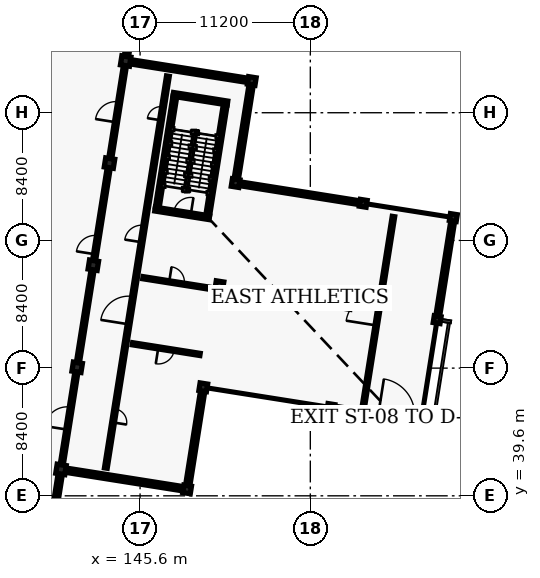
"""IFC4 building model, lengths in metres.
Left out: names, types, materials, properties, quantities, classifications, styles, units other than length and angle.
Written with IfcOpenShell. Run it as: python <this file> out.ifc"""

import sys

from ifc_helpers import new_model, si_unit, direction, frame, frame_2d, origin, origin_2d, place, context, subcontext, project, spatial, rectangle, circle, extrude, element, fill, save


model = new_model("IFC4")
c1 = context("Model", 3, precision=1e-05, world=origin(), true_north=direction((0.0, 1.0)))
c2 = subcontext(c1, "Body", "Model", "MODEL_VIEW")
j1 = project(units=[si_unit("LENGTHUNIT", "METRE"), si_unit("PLANEANGLEUNIT", "RADIAN")], contexts=[c1])
p1 = place(None, origin())
s1 = spatial("IfcSite", under=j1, at=p1, CompositionType="ELEMENT")
p2 = place(p1, origin())
s2 = spatial("IfcBuilding", under=s1, at=p2, CompositionType="ELEMENT")
p3 = place(p2, origin())
s3 = spatial("IfcBuildingStorey", under=s2, at=p3, CompositionType="ELEMENT", Elevation=0.0)
for number, where, z_axis, x_axis in (
    (1, (140.398, 41.337, 0.0), (0.0, 0.0, 1.0), (0.988, -0.156, 0.0)),
    (2, (141.462, 48.054, 0.0), (0.0, 0.0, 1.0), (0.988, -0.156, 0.0)),
    (3, (142.525, 54.77, 0.0), (0.0, 0.0, 1.0), (0.988, -0.156, 0.0)),
    (4, (143.589, 61.486, 0.0), (0.0, 0.0, 1.0), (0.988, -0.156, 0.0)),
    (5, (144.653, 68.202, 0.0), (0.0, 0.0, 1.0), (0.988, -0.156, 0.0)),
):
    element("IfcColumn", number, at=place(p3, frame(where, z_axis=z_axis, x_axis=x_axis)), inside=s3, PredefinedType="COLUMN", context=c2, shape_type="SweptSolid", body=[
        extrude(rectangle(XDim=0.6, YDim=0.6, at=origin_2d()), origin(), (0.0, 0.0, 1.0), 4.8),
    ])
for number, where, z_axis, x_axis in (
    (6, (148.694, 40.023, 0.0), (0.0, 0.0, 1.0), (0.988, -0.156, 0.0)),
    (7, (149.758, 46.74, 0.0), (0.0, 0.0, 1.0), (0.988, -0.156, 0.0)),
    (8, (150.822, 53.456, 0.0), (0.0, 0.0, 1.0), (0.988, -0.156, 0.0)),
    (9, (151.886, 60.172, 0.0), (0.0, 0.0, 1.0), (0.988, -0.156, 0.0)),
    (10, (152.949, 66.888, 0.0), (0.0, 0.0, 1.0), (0.988, -0.156, 0.0)),
):
    element("IfcColumn", number, at=place(p3, frame(where, z_axis=z_axis, x_axis=x_axis)), inside=s3, PredefinedType="COLUMN", context=c2, shape_type="SweptSolid", body=[
        extrude(rectangle(XDim=0.5, YDim=0.5, at=origin_2d()), origin(), (0.0, 0.0, 1.0), 4.8),
    ])
for number, where, z_axis, x_axis in (
    (11, (158.154, 45.41, 0.0), (0.0, 0.0, 1.0), (0.988, -0.156, 0.0)),
    (12, (159.217, 52.126, 0.0), (0.0, 0.0, 1.0), (0.988, -0.156, 0.0)),
    (13, (160.281, 58.842, 0.0), (0.0, 0.0, 1.0), (0.988, -0.156, 0.0)),
    (14, (164.08, 44.471, 0.0), (0.0, 0.0, 1.0), (0.988, -0.156, 0.0)),
    (15, (165.143, 51.188, 0.0), (0.0, 0.0, 1.0), (0.988, -0.156, 0.0)),
    (16, (166.207, 57.904, 0.0), (0.0, 0.0, 1.0), (0.988, -0.156, 0.0)),
):
    element("IfcColumn", number, at=place(p3, frame(where, z_axis=z_axis, x_axis=x_axis)), inside=s3, PredefinedType="PILASTER", context=c2, shape_type="SweptSolid", body=[
        extrude(circle(Radius=0.225, at=origin_2d()), origin(), (0.0, 0.0, 1.0), 4.8),
    ])
p4 = place(p3, frame((148.71, 40.122, 0.0), z_axis=(0.0, 0.0, 1.0), x_axis=(0.156500089252, 0.987677944506, 0.0)))
e17 = element("IfcWall", 17, at=p4, inside=s3, PredefinedType="SOLIDWALL", context=c2, shape_type="SweptSolid", body=[
    extrude(rectangle(XDim=6.6, YDim=0.28, at=frame_2d((3.3, 0.0))), origin(), (0.0, 0.0, 1.0), 3.928),
])
p5 = place(p4, frame((2.6, 0.0, 1.35)))
e18 = element("IfcOpeningElement", 18, at=p5, cuts=e17, PredefinedType="OPENING", context=c2, shape_type="SweptSolid", body=[
    extrude(rectangle(XDim=1.4, YDim=1.2, at=frame_2d((0.7, 0.6))), frame((0.0, 0.15, 0.0), z_axis=(0.0, -1.0, 0.0), x_axis=(1.0, 0.0, 0.0)), (0.0, 0.0, 1.0), 0.3),
])
p6 = place(p3, frame((151.901, 60.271, 0.0), z_axis=(0.0, 0.0, 1.0), x_axis=(0.156536171909, 0.987672226442, 0.0)))
e19 = element("IfcWall", 19, at=p6, inside=s3, PredefinedType="SOLIDWALL", context=c2, shape_type="SweptSolid", body=[
    extrude(rectangle(XDim=6.6, YDim=0.28, at=frame_2d((3.3, 0.0))), origin(), (0.0, 0.0, 1.0), 3.928),
])
p7 = place(p6, frame((2.6, 0.0, 1.35)))
e20 = element("IfcOpeningElement", 20, at=p7, cuts=e19, PredefinedType="OPENING", context=c2, shape_type="SweptSolid", body=[
    extrude(rectangle(XDim=1.4, YDim=1.2, at=frame_2d((0.7, 0.6))), frame((0.0, 0.15, 0.0), z_axis=(0.0, -1.0, 0.0), x_axis=(1.0, 0.0, 0.0)), (0.0, 0.0, 1.0), 0.3),
])
p8 = place(p3, frame((138.283, 27.984, 0.0), z_axis=(0.0, 0.0, 1.0), x_axis=(0.156407521508, 0.987692607655, 0.0)))
e21 = element("IfcWall", 21, at=p8, inside=s3, PredefinedType="SOLIDWALL", context=c2, shape_type="SweptSolid", body=[
    extrude(rectangle(XDim=13.44, YDim=0.28, at=frame_2d((6.72, 0.0))), origin(), (0.0, 0.0, 1.0), 4.006),
])
p9 = place(p3, frame((140.477, 41.324, 0.0), z_axis=(0.0, 0.0, 1.0), x_axis=(0.98770403257, -0.156335357629, 0.0)))
e22 = element("IfcWall", 22, at=p9, inside=s3, PredefinedType="SOLIDWALL", context=c2, shape_type="SweptSolid", body=[
    extrude(rectangle(XDim=8.239, YDim=0.28, at=frame_2d((4.12, 0.0))), origin(), (0.0, 0.0, 1.0), 4.006),
])
p10 = place(p3, frame((144.732, 68.189, 0.0), z_axis=(0.0, 0.0, 1.0), x_axis=(0.987704756752, -0.156330782283, 0.0)))
e23 = element("IfcWall", 23, at=p10, inside=s3, PredefinedType="SOLIDWALL", context=c2, shape_type="SweptSolid", body=[
    extrude(rectangle(XDim=8.24, YDim=0.28, at=frame_2d((4.12, 0.0))), origin(), (0.0, 0.0, 1.0), 4.006),
])
p11 = place(p3, frame((144.666, 68.281, 0.0), z_axis=(0.0, 0.0, 1.0), x_axis=(0.15632126228, 0.987706263501, 0.0)))
e24 = element("IfcWall", 24, at=p11, inside=s3, PredefinedType="SOLIDWALL", context=c2, shape_type="SweptSolid", body=[
    extrude(rectangle(XDim=6.641, YDim=0.28, at=frame_2d((3.32, 0.0))), origin(), (0.0, 0.0, 1.0), 4.135),
])
p12 = place(p3, frame((158.233, 45.397, 0.0), z_axis=(0.0, 0.0, 1.0), x_axis=(0.987701196417, -0.156353274977, 0.0)))
e25 = element("IfcWall", 25, at=p12, inside=s3, PredefinedType="SOLIDWALL", context=c2, shape_type="SweptSolid", body=[
    extrude(rectangle(XDim=5.84, YDim=0.25, at=frame_2d((2.92, 0.0))), origin(), (0.0, 0.0, 1.0), 4.375),
])
p13 = place(p12, frame((3.07, 0.0, 0.0)))
e26 = element("IfcOpeningElement", 26, at=p13, cuts=e25, PredefinedType="OPENING", context=c2, shape_type="SweptSolid", body=[
    extrude(rectangle(XDim=2.4, YDim=2.4, at=frame_2d((1.2, 1.2))), frame((0.0, 0.135, 0.0), z_axis=(0.0, -1.0, 0.0), x_axis=(1.0, 0.0, 0.0)), (0.0, 0.0, 1.0), 0.27),
])
p14 = place(p3, frame((165.156, 51.267, 0.0), z_axis=(0.0, 0.0, 1.0), x_axis=(0.156349649217, 0.987701770369, 0.0)))
e27 = element("IfcWall", 27, at=p14, inside=s3, PredefinedType="SOLIDWALL", context=c2, shape_type="SweptSolid", body=[
    extrude(rectangle(XDim=6.639, YDim=0.25, at=frame_2d((3.32, 0.0))), origin(), (0.0, 0.0, 1.0), 4.375),
])
p15 = place(p14, frame((1.413, 0.0, 0.9)))
e28 = element("IfcOpeningElement", 28, at=p15, cuts=e27, PredefinedType="OPENING", context=c2, shape_type="SweptSolid", body=[
    extrude(rectangle(XDim=1.6, YDim=2.1, at=frame_2d((0.8, 1.05))), frame((0.0, 0.135, 0.0), z_axis=(0.0, -1.0, 0.0), x_axis=(1.0, 0.0, 0.0)), (0.0, 0.0, 1.0), 0.27),
])
p16 = place(p14, frame((3.627, 0.0, 0.9)))
e29 = element("IfcOpeningElement", 29, at=p16, cuts=e27, PredefinedType="OPENING", context=c2, shape_type="SweptSolid", body=[
    extrude(rectangle(XDim=1.6, YDim=2.1, at=frame_2d((0.8, 1.05))), frame((0.0, 0.135, 0.0), z_axis=(0.0, -1.0, 0.0), x_axis=(1.0, 0.0, 0.0)), (0.0, 0.0, 1.0), 0.27),
])
p17 = place(p3, frame((151.965, 60.159, 0.0), z_axis=(0.0, 0.0, 1.0), x_axis=(0.987699982026, -0.156360946233, 0.0)))
e30 = element("IfcWall", 30, at=p17, inside=s3, PredefinedType="SOLIDWALL", context=c2, shape_type="SweptSolid", body=[
    extrude(rectangle(XDim=8.339, YDim=0.25, at=frame_2d((4.17, 0.0))), origin(), (0.0, 0.0, 1.0), 4.375),
])
p18 = place(p17, frame((1.98, 0.0, 0.9)))
e31 = element("IfcOpeningElement", 31, at=p18, cuts=e30, PredefinedType="OPENING", context=c2, shape_type="SweptSolid", body=[
    extrude(rectangle(XDim=1.6, YDim=2.1, at=frame_2d((0.8, 1.05))), frame((0.0, 0.135, 0.0), z_axis=(0.0, -1.0, 0.0), x_axis=(1.0, 0.0, 0.0)), (0.0, 0.0, 1.0), 0.27),
])
p19 = place(p17, frame((4.76, 0.0, 0.9)))
e32 = element("IfcOpeningElement", 32, at=p19, cuts=e30, PredefinedType="OPENING", context=c2, shape_type="SweptSolid", body=[
    extrude(rectangle(XDim=1.6, YDim=2.1, at=frame_2d((0.8, 1.05))), frame((0.0, 0.135, 0.0), z_axis=(0.0, -1.0, 0.0), x_axis=(1.0, 0.0, 0.0)), (0.0, 0.0, 1.0), 0.27),
])
p20 = place(p3, frame((150.153, 57.895, 0.0), z_axis=(0.0, 0.0, 1.0), x_axis=(-0.987676717047, 0.156507835599, 0.0)))
e33 = element("IfcWall", 33, at=p20, inside=s3, PredefinedType="SHEAR", context=c2, shape_type="SweptSolid", body=[
    extrude(rectangle(XDim=3.61, YDim=0.25, at=frame_2d((1.805, 0.0))), origin(), (0.0, 0.0, 1.0), 4.56),
])
p21 = place(p20, frame((1.235, 0.0, 0.0)))
e34 = element("IfcOpeningElement", 34, at=p21, cuts=e33, PredefinedType="OPENING", context=c2, shape_type="SweptSolid", body=[
    extrude(rectangle(XDim=1.14, YDim=2.15, at=frame_2d((0.57, 1.075))), frame((0.0, 0.135, 0.0), z_axis=(0.0, -1.0, 0.0), x_axis=(1.0, 0.0, 0.0)), (0.0, 0.0, 1.0), 0.27),
])
p22 = place(p3, frame((147.783, 66.006, 0.0), z_axis=(0.0, 0.0, 1.0), x_axis=(0.987664601714, -0.156584272906, 0.0)))
e35 = element("IfcWall", 35, at=p22, inside=s3, PredefinedType="SHEAR", context=c2, shape_type="SweptSolid", body=[
    extrude(rectangle(XDim=3.609, YDim=0.25, at=frame_2d((1.805, 0.0))), origin(), (0.0, 0.0, 1.0), 4.56),
])
p23 = place(p3, frame((146.731, 58.564, 0.0), z_axis=(0.0, 0.0, 1.0), x_axis=(0.15642738738, 0.98768946156, 0.0)))
e36 = element("IfcWall", 36, at=p23, inside=s3, PredefinedType="SHEAR", context=c2, shape_type="SweptSolid", body=[
    extrude(rectangle(XDim=7.39, YDim=0.25, at=frame_2d((3.695, 0.0))), origin(), (0.0, 0.0, 1.0), 4.56),
])
p24 = place(p3, frame((151.205, 65.337, 0.0), z_axis=(0.0, 0.0, 1.0), x_axis=(-0.156432491725, -0.987688653136, 0.0)))
e37 = element("IfcWall", 37, at=p24, inside=s3, PredefinedType="SHEAR", context=c2, shape_type="SweptSolid", body=[
    extrude(rectangle(XDim=7.39, YDim=0.25, at=frame_2d((3.695, 0.0))), origin(), (0.0, 0.0, 1.0), 4.56),
])
p25 = place(p3, frame((140.453, 41.683, 0.0), z_axis=(0.0, 0.0, 1.0), x_axis=(0.156410600741, 0.987692120033, 0.0)))
e38 = element("IfcWall", 38, at=p25, inside=s3, PredefinedType="PARTITIONING", context=c2, shape_type="SweptSolid", body=[
    extrude(rectangle(XDim=6.1, YDim=0.2, at=frame_2d((3.05, 0.0))), origin(), (0.0, 0.0, 1.0), 3.928),
])
p26 = place(p25, frame((2.3, 0.0, 0.0)))
e39 = element("IfcOpeningElement", 39, at=p26, cuts=e38, PredefinedType="OPENING", context=c2, shape_type="SweptSolid", body=[
    extrude(rectangle(XDim=1.5, YDim=2.25, at=frame_2d((0.75, 1.125))), frame((0.0, 0.11, 0.0), z_axis=(0.0, -1.0, 0.0), x_axis=(1.0, 0.0, 0.0)), (0.0, 0.0, 1.0), 0.22),
])
p27 = place(p3, frame((141.517, 48.4, 0.0), z_axis=(0.0, 0.0, 1.0), x_axis=(0.156361063903, 0.987699963397, 0.0)))
e40 = element("IfcWall", 40, at=p27, inside=s3, PredefinedType="PARTITIONING", context=c2, shape_type="SweptSolid", body=[
    extrude(rectangle(XDim=12.899, YDim=0.2, at=frame_2d((6.449, 0.0))), origin(), (0.0, 0.0, 1.0), 3.928),
])
p28 = place(p27, frame((7.179, 0.0, 0.0)))
e41 = element("IfcOpeningElement", 41, at=p28, cuts=e40, PredefinedType="OPENING", context=c2, shape_type="SweptSolid", body=[
    extrude(rectangle(XDim=1.24, YDim=2.2, at=frame_2d((0.62, 1.1))), frame((0.0, 0.11, 0.0), z_axis=(0.0, -1.0, 0.0), x_axis=(1.0, 0.0, 0.0)), (0.0, 0.0, 1.0), 0.22),
])
p29 = place(p3, frame((143.644, 61.832, 0.0), z_axis=(0.0, 0.0, 1.0), x_axis=(0.156396286335, 0.987694386752, 0.0)))
e42 = element("IfcWall", 42, at=p29, inside=s3, PredefinedType="PARTITIONING", context=c2, shape_type="SweptSolid", body=[
    extrude(rectangle(XDim=6.099, YDim=0.2, at=frame_2d((3.049, 0.0))), origin(), (0.0, 0.0, 1.0), 3.928),
])
p30 = place(p29, frame((2.37, 0.0, 0.0)))
e43 = element("IfcOpeningElement", 43, at=p30, cuts=e42, PredefinedType="OPENING", context=c2, shape_type="SweptSolid", body=[
    extrude(rectangle(XDim=1.36, YDim=2.22, at=frame_2d((0.68, 1.11))), frame((0.0, 0.11, 0.0), z_axis=(0.0, -1.0, 0.0), x_axis=(1.0, 0.0, 0.0)), (0.0, 0.0, 1.0), 0.22),
])
p31 = place(p3, frame((160.314, 45.625, 0.0), z_axis=(0.0, 0.0, 1.0), x_axis=(0.156420950688, 0.987690480963, 0.0)))
e44 = element("IfcWall", 44, at=p31, inside=s3, PredefinedType="PARTITIONING", context=c2, shape_type="SweptSolid", body=[
    extrude(rectangle(XDim=12.499, YDim=0.16, at=frame_2d((6.25, 0.0))), origin(), (0.0, 0.0, 1.0), 4.545),
])
p32 = place(p31, frame((5.249, 0.0, 0.0)))
e45 = element("IfcOpeningElement", 45, at=p32, cuts=e44, PredefinedType="OPENING", context=c2, shape_type="SweptSolid", body=[
    extrude(rectangle(XDim=2.0, YDim=2.3, at=frame_2d((1.0, 1.15))), frame((0.0, 0.09, 0.0), z_axis=(0.0, -1.0, 0.0), x_axis=(1.0, 0.0, 0.0)), (0.0, 0.0, 1.0), 0.18),
])
p33 = place(p3, frame((143.348, 41.427, 0.0), z_axis=(0.0, 0.0, 1.0), x_axis=(0.156440506918, 0.987687383637, 0.0)))
e46 = element("IfcWall", 46, at=p33, inside=s3, PredefinedType="PARTITIONING", context=c2, shape_type="SweptSolid", body=[
    extrude(rectangle(XDim=26.099, YDim=0.18, at=frame_2d((13.05, 0.0))), origin(), (0.0, 0.0, 1.0), 4.006),
])
p34 = place(p33, frame((9.575, 0.0, 0.0)))
e47 = element("IfcOpeningElement", 47, at=p34, cuts=e46, PredefinedType="OPENING", context=c2, shape_type="SweptSolid", body=[
    extrude(rectangle(XDim=1.85, YDim=2.22, at=frame_2d((0.925, 1.11))), frame((0.0, 0.1, 0.0), z_axis=(0.0, -1.0, 0.0), x_axis=(1.0, 0.0, 0.0)), (0.0, 0.0, 1.0), 0.2),
])
p35 = place(p33, frame((15.04, 0.0, 0.0)))
e48 = element("IfcOpeningElement", 48, at=p35, cuts=e46, PredefinedType="OPENING", context=c2, shape_type="SweptSolid", body=[
    extrude(rectangle(XDim=1.12, YDim=2.16, at=frame_2d((0.56, 1.08))), frame((0.0, 0.1, 0.0), z_axis=(0.0, -1.0, 0.0), x_axis=(1.0, 0.0, 0.0)), (0.0, 0.0, 1.0), 0.2),
])
p36 = place(p33, frame((3.039, 0.0, 0.0)))
e49 = element("IfcOpeningElement", 49, at=p36, cuts=e46, PredefinedType="OPENING", context=c2, shape_type="SweptSolid", body=[
    extrude(rectangle(XDim=0.9, YDim=2.06, at=frame_2d((0.45, 1.03))), frame((0.0, 0.1, 0.0), z_axis=(0.0, -1.0, 0.0), x_axis=(1.0, 0.0, 0.0)), (0.0, 0.0, 1.0), 0.2),
])
p37 = place(p33, frame((23.161, 0.0, 0.0)))
e50 = element("IfcOpeningElement", 50, at=p37, cuts=e46, PredefinedType="OPENING", context=c2, shape_type="SweptSolid", body=[
    extrude(rectangle(XDim=0.9, YDim=2.06, at=frame_2d((0.45, 1.03))), frame((0.0, 0.1, 0.0), z_axis=(0.0, -1.0, 0.0), x_axis=(1.0, 0.0, 0.0)), (0.0, 0.0, 1.0), 0.2),
])
p38 = place(p3, frame((145.099, 49.603, 0.0), z_axis=(0.0, 0.0, 1.0), x_axis=(0.987712756743, -0.156280229613, 0.0)))
e51 = element("IfcWall", 51, at=p38, inside=s3, PredefinedType="PARTITIONING", context=c2, shape_type="SweptSolid", body=[
    extrude(rectangle(XDim=4.499, YDim=0.14, at=frame_2d((2.25, 0.0))), origin(), (0.0, 0.0, 1.0), 4.135),
])
p39 = place(p38, frame((1.72, 0.0, 0.0)))
e52 = element("IfcOpeningElement", 52, at=p39, cuts=e51, PredefinedType="OPENING", context=c2, shape_type="SweptSolid", body=[
    extrude(rectangle(XDim=1.06, YDim=2.16, at=frame_2d((0.53, 1.08))), frame((0.0, 0.08, 0.0), z_axis=(0.0, -1.0, 0.0), x_axis=(1.0, 0.0, 0.0)), (0.0, 0.0, 1.0), 0.16),
])
p40 = place(p3, frame((145.787, 53.949, 0.0), z_axis=(0.0, 0.0, 1.0), x_axis=(0.98772113158, -0.156227290288, 0.0)))
e53 = element("IfcWall", 53, at=p40, inside=s3, PredefinedType="PARTITIONING", context=c2, shape_type="SweptSolid", body=[
    extrude(rectangle(XDim=4.499, YDim=0.14, at=frame_2d((2.25, 0.0))), origin(), (0.0, 0.0, 1.0), 4.135),
])
p41 = place(p40, frame((1.75, 0.0, 0.0)))
e54 = element("IfcOpeningElement", 54, at=p41, cuts=e53, PredefinedType="OPENING", context=c2, shape_type="SweptSolid", body=[
    extrude(rectangle(XDim=1.0, YDim=2.14, at=frame_2d((0.5, 1.07))), frame((0.0, 0.08, 0.0), z_axis=(0.0, -1.0, 0.0), x_axis=(1.0, 0.0, 0.0)), (0.0, 0.0, 1.0), 0.16),
])
p42 = place(p5, origin())
e55 = element("IfcWindow", 55, at=p42, inside=s3, PartitioningType="SINGLE_PANEL", PredefinedType="WINDOW", context=c2, shape_type="SweptSolid", body=[
    extrude(rectangle(XDim=1.4, YDim=1.2, at=frame_2d((0.7, 0.6))), frame((0.0, 0.03, 0.0), z_axis=(0.0, -1.0, 0.0), x_axis=(1.0, 0.0, 0.0)), (0.0, 0.0, 1.0), 0.06),
])
fill(e18, e55)
p43 = place(p7, origin())
e56 = element("IfcWindow", 56, at=p43, inside=s3, PartitioningType="SINGLE_PANEL", PredefinedType="WINDOW", context=c2, shape_type="SweptSolid", body=[
    extrude(rectangle(XDim=1.4, YDim=1.2, at=frame_2d((0.7, 0.6))), frame((0.0, 0.03, 0.0), z_axis=(0.0, -1.0, 0.0), x_axis=(1.0, 0.0, 0.0)), (0.0, 0.0, 1.0), 0.06),
])
fill(e20, e56)
p44 = place(p15, origin())
e57 = element("IfcWindow", 57, at=p44, inside=s3, PartitioningType="SINGLE_PANEL", PredefinedType="WINDOW", context=c2, shape_type="SweptSolid", body=[
    extrude(rectangle(XDim=1.6, YDim=2.1, at=frame_2d((0.8, 1.05))), frame((0.0, 0.03, 0.0), z_axis=(0.0, -1.0, 0.0), x_axis=(1.0, 0.0, 0.0)), (0.0, 0.0, 1.0), 0.06),
])
fill(e28, e57)
p45 = place(p16, origin())
e58 = element("IfcWindow", 58, at=p45, inside=s3, PartitioningType="SINGLE_PANEL", PredefinedType="WINDOW", context=c2, shape_type="SweptSolid", body=[
    extrude(rectangle(XDim=1.6, YDim=2.1, at=frame_2d((0.8, 1.05))), frame((0.0, 0.03, 0.0), z_axis=(0.0, -1.0, 0.0), x_axis=(1.0, 0.0, 0.0)), (0.0, 0.0, 1.0), 0.06),
])
fill(e29, e58)
p46 = place(p18, origin())
e59 = element("IfcWindow", 59, at=p46, inside=s3, PartitioningType="SINGLE_PANEL", PredefinedType="WINDOW", context=c2, shape_type="SweptSolid", body=[
    extrude(rectangle(XDim=1.6, YDim=2.1, at=frame_2d((0.8, 1.05))), frame((0.0, 0.03, 0.0), z_axis=(0.0, -1.0, 0.0), x_axis=(1.0, 0.0, 0.0)), (0.0, 0.0, 1.0), 0.06),
])
fill(e31, e59)
p47 = place(p19, origin())
e60 = element("IfcWindow", 60, at=p47, inside=s3, PartitioningType="SINGLE_PANEL", PredefinedType="WINDOW", context=c2, shape_type="SweptSolid", body=[
    extrude(rectangle(XDim=1.6, YDim=2.1, at=frame_2d((0.8, 1.05))), frame((0.0, 0.03, 0.0), z_axis=(0.0, -1.0, 0.0), x_axis=(1.0, 0.0, 0.0)), (0.0, 0.0, 1.0), 0.06),
])
fill(e32, e60)
p48 = place(p21, origin())
e61 = element("IfcDoor", 61, at=p48, inside=s3, OperationType="SINGLE_SWING_RIGHT", PredefinedType="DOOR", context=c2, shape_type="SweptSolid", body=[
    extrude(rectangle(XDim=1.14, YDim=2.15, at=frame_2d((0.57, 1.075))), frame((0.0, 0.025, 0.0), z_axis=(0.0, -1.0, 0.0), x_axis=(1.0, 0.0, 0.0)), (0.0, 0.0, 1.0), 0.05),
])
fill(e34, e61)
p49 = place(p13, origin())
e62 = element("IfcDoor", 62, at=p49, inside=s3, OperationType="DOUBLE_DOOR_SINGLE_SWING", PredefinedType="DOOR", context=c2, shape_type="SweptSolid", body=[
    extrude(rectangle(XDim=2.4, YDim=2.4, at=frame_2d((1.2, 1.2))), frame((0.0, 0.025, 0.0), z_axis=(0.0, -1.0, 0.0), x_axis=(1.0, 0.0, 0.0)), (0.0, 0.0, 1.0), 0.05),
])
fill(e26, e62)
p50 = place(p26, origin())
e63 = element("IfcDoor", 63, at=p50, inside=s3, OperationType="DOUBLE_DOOR_SINGLE_SWING", PredefinedType="DOOR", context=c2, shape_type="SweptSolid", body=[
    extrude(rectangle(XDim=1.5, YDim=2.25, at=frame_2d((0.75, 1.125))), frame((0.0, 0.025, 0.0), z_axis=(0.0, -1.0, 0.0), x_axis=(1.0, 0.0, 0.0)), (0.0, 0.0, 1.0), 0.05),
])
fill(e39, e63)
p51 = place(p28, origin())
e64 = element("IfcDoor", 64, at=p51, inside=s3, OperationType="SINGLE_SWING_LEFT", PredefinedType="DOOR", context=c2, shape_type="SweptSolid", body=[
    extrude(rectangle(XDim=1.24, YDim=2.2, at=frame_2d((0.62, 1.1))), frame((0.0, 0.025, 0.0), z_axis=(0.0, -1.0, 0.0), x_axis=(1.0, 0.0, 0.0)), (0.0, 0.0, 1.0), 0.05),
])
fill(e41, e64)
p52 = place(p30, origin())
e65 = element("IfcDoor", 65, at=p52, inside=s3, OperationType="DOUBLE_DOOR_SINGLE_SWING", PredefinedType="DOOR", context=c2, shape_type="SweptSolid", body=[
    extrude(rectangle(XDim=1.36, YDim=2.22, at=frame_2d((0.68, 1.11))), frame((0.0, 0.025, 0.0), z_axis=(0.0, -1.0, 0.0), x_axis=(1.0, 0.0, 0.0)), (0.0, 0.0, 1.0), 0.05),
])
fill(e43, e65)
p53 = place(p32, origin())
e66 = element("IfcDoor", 66, at=p53, inside=s3, OperationType="DOUBLE_DOOR_SINGLE_SWING", PredefinedType="DOOR", context=c2, shape_type="SweptSolid", body=[
    extrude(rectangle(XDim=2.0, YDim=2.3, at=frame_2d((1.0, 1.15))), frame((0.0, 0.025, 0.0), z_axis=(0.0, -1.0, 0.0), x_axis=(1.0, 0.0, 0.0)), (0.0, 0.0, 1.0), 0.05),
])
fill(e45, e66)
p54 = place(p34, origin())
e67 = element("IfcDoor", 67, at=p54, inside=s3, OperationType="DOUBLE_DOOR_SINGLE_SWING", PredefinedType="DOOR", context=c2, shape_type="SweptSolid", body=[
    extrude(rectangle(XDim=1.85, YDim=2.22, at=frame_2d((0.925, 1.11))), frame((0.0, 0.025, 0.0), z_axis=(0.0, -1.0, 0.0), x_axis=(1.0, 0.0, 0.0)), (0.0, 0.0, 1.0), 0.05),
])
fill(e47, e67)
p55 = place(p35, origin())
e68 = element("IfcDoor", 68, at=p55, inside=s3, OperationType="SINGLE_SWING_LEFT", PredefinedType="DOOR", context=c2, shape_type="SweptSolid", body=[
    extrude(rectangle(XDim=1.12, YDim=2.16, at=frame_2d((0.56, 1.08))), frame((0.0, 0.025, 0.0), z_axis=(0.0, -1.0, 0.0), x_axis=(1.0, 0.0, 0.0)), (0.0, 0.0, 1.0), 0.05),
])
fill(e48, e68)
p56 = place(p39, origin())
e69 = element("IfcDoor", 69, at=p56, inside=s3, OperationType="SINGLE_SWING_RIGHT", PredefinedType="DOOR", context=c2, shape_type="SweptSolid", body=[
    extrude(rectangle(XDim=1.06, YDim=2.16, at=frame_2d((0.53, 1.08))), frame((0.0, 0.025, 0.0), z_axis=(0.0, -1.0, 0.0), x_axis=(1.0, 0.0, 0.0)), (0.0, 0.0, 1.0), 0.05),
])
fill(e52, e69)
p57 = place(p41, origin())
e70 = element("IfcDoor", 70, at=p57, inside=s3, OperationType="SINGLE_SWING_LEFT", PredefinedType="DOOR", context=c2, shape_type="SweptSolid", body=[
    extrude(rectangle(XDim=1.0, YDim=2.14, at=frame_2d((0.5, 1.07))), frame((0.0, 0.025, 0.0), z_axis=(0.0, -1.0, 0.0), x_axis=(1.0, 0.0, 0.0)), (0.0, 0.0, 1.0), 0.05),
])
fill(e54, e70)
p58 = place(p36, origin())
e71 = element("IfcDoor", 71, at=p58, inside=s3, OperationType="SINGLE_SWING_RIGHT", PredefinedType="DOOR", context=c2, shape_type="SweptSolid", body=[
    extrude(rectangle(XDim=0.9, YDim=2.06, at=frame_2d((0.45, 1.03))), frame((0.0, 0.025, 0.0), z_axis=(0.0, -1.0, 0.0), x_axis=(1.0, 0.0, 0.0)), (0.0, 0.0, 1.0), 0.05),
])
fill(e49, e71)
p59 = place(p37, origin())
e72 = element("IfcDoor", 72, at=p59, inside=s3, OperationType="SINGLE_SWING_LEFT", PredefinedType="DOOR", context=c2, shape_type="SweptSolid", body=[
    extrude(rectangle(XDim=0.9, YDim=2.06, at=frame_2d((0.45, 1.03))), frame((0.0, 0.025, 0.0), z_axis=(0.0, -1.0, 0.0), x_axis=(1.0, 0.0, 0.0)), (0.0, 0.0, 1.0), 0.05),
])
fill(e50, e72)
save(model, sys.argv[1])
